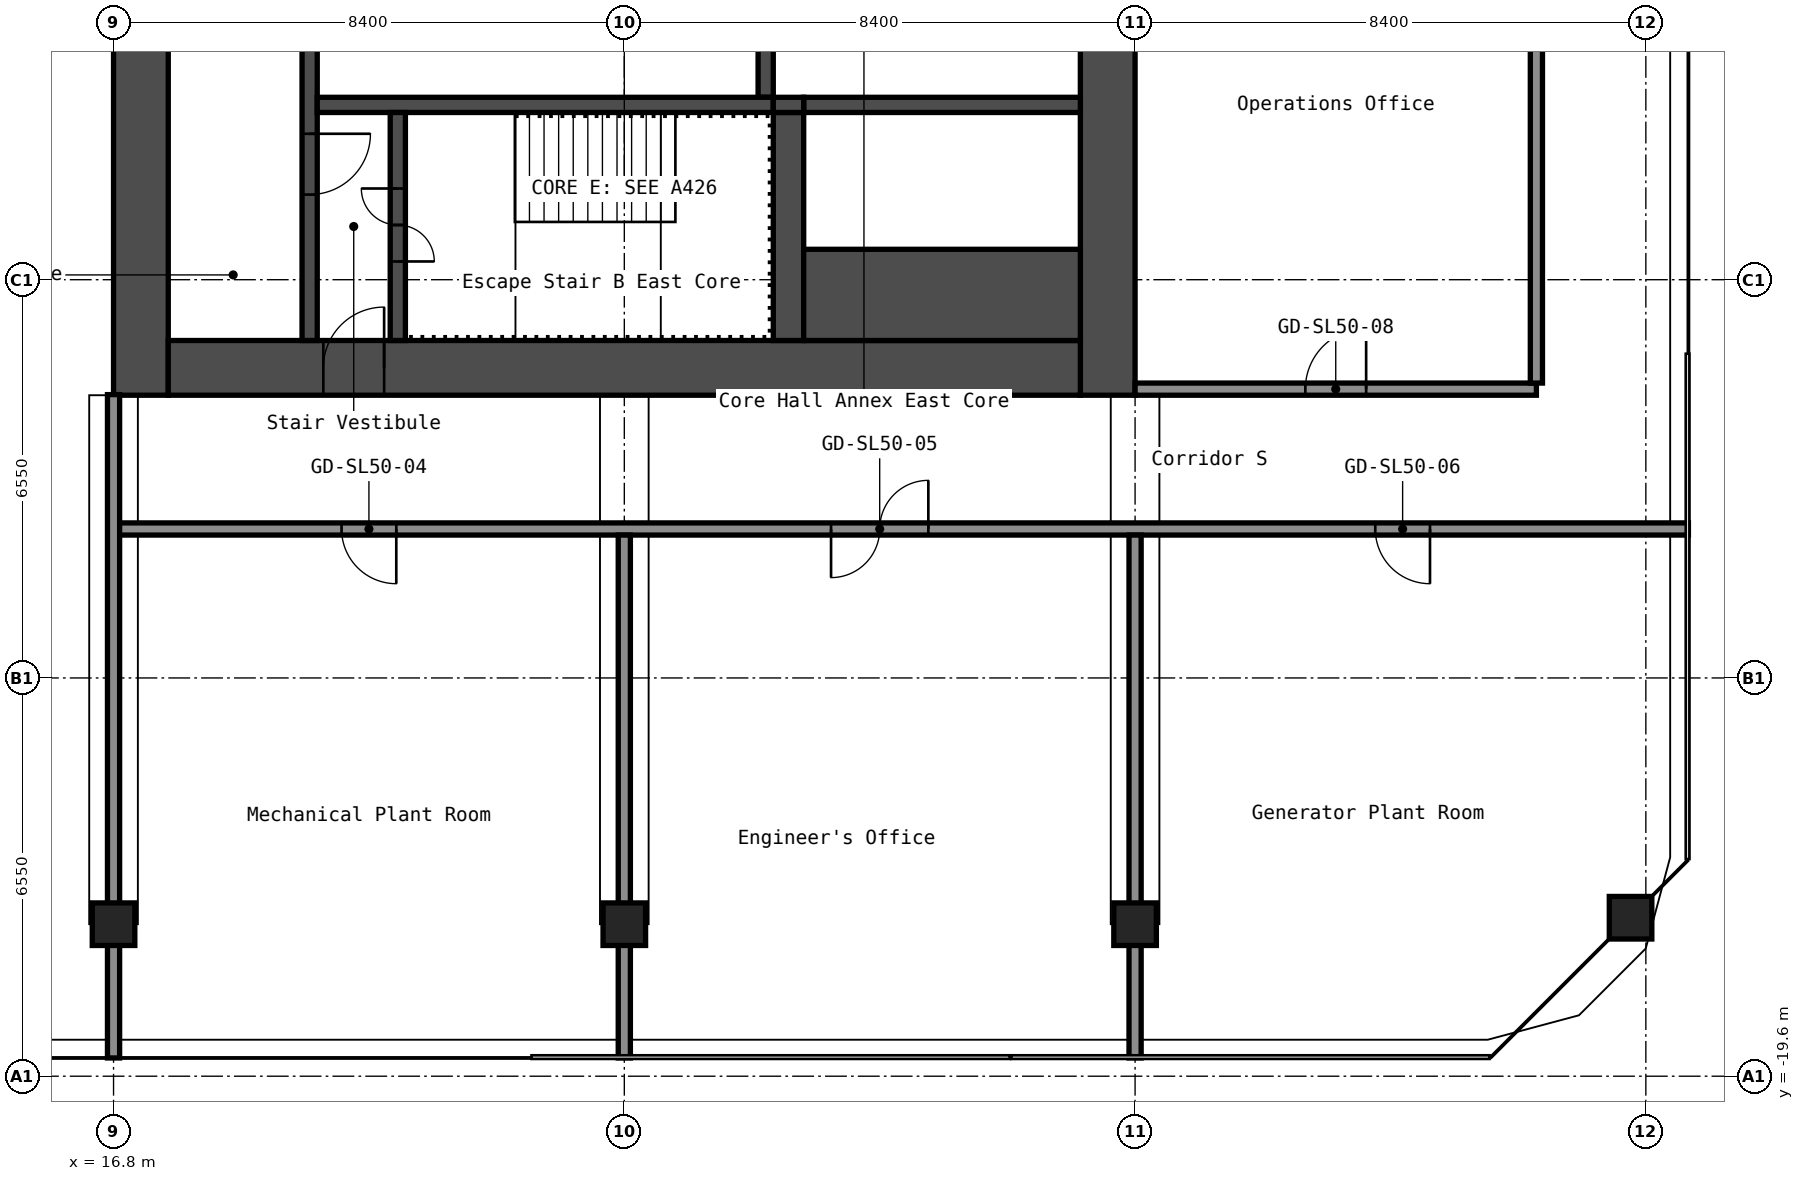
"""IFC4 building model, lengths in metres.
Left out: names, types, materials, properties, quantities, classifications, styles, units other than length and angle.
Written with IfcOpenShell. Run it as: python <this file> out.ifc"""

import sys

from ifc_helpers import new_model, si_unit, direction, frame, frame_2d, origin, origin_2d, place, context, subcontext, project, spatial, rectangle, hollow_rectangle, extrude, element, fill, save


model = new_model("IFC4")
c1 = context("Model", 3, precision=1e-05, world=origin(), true_north=direction((0.0, 1.0)))
c2 = subcontext(c1, "Body", "Model", "MODEL_VIEW")
j1 = project(units=[si_unit("LENGTHUNIT", "METRE"), si_unit("PLANEANGLEUNIT", "RADIAN")], contexts=[c1])
p1 = place(None, origin())
s1 = spatial("IfcSite", under=j1, at=p1, CompositionType="ELEMENT")
p2 = place(p1, origin())
s2 = spatial("IfcBuilding", under=s1, at=p2, CompositionType="ELEMENT")
p3 = place(p2, frame((0.0, 0.0, 175.8)))
s3 = spatial("IfcBuildingStorey", under=s2, at=p3, CompositionType="ELEMENT", Elevation=175.8)
for number, where, z_axis, x_axis in (
    (1, (16.8, -17.1, 0.0), (0.0, 0.0, 1.0), (1.0, 0.0, 0.0)),
    (2, (25.2, -17.1, 0.0), (0.0, 0.0, 1.0), (1.0, 0.0, 0.0)),
    (3, (33.6, -17.1, 0.0), (0.0, 0.0, 1.0), (1.0, 0.0, 0.0)),
    (4, (41.749, -16.994, 0.0), (0.0, 0.0, 1.0), (1.0, 0.0, 0.0)),
):
    element("IfcColumn", number, at=place(p3, frame(where, z_axis=z_axis, x_axis=x_axis)), inside=s3, PredefinedType="COLUMN", context=c2, shape_type="SweptSolid", body=[
        extrude(hollow_rectangle(XDim=0.7, YDim=0.7, WallThickness=0.028, at=origin_2d()), origin(), (0.0, 0.0, 1.0), 4.1),
    ])
p4 = place(p3, frame((17.25, -8.4, 0.0), z_axis=(0.0, 0.0, 1.0), x_axis=(0.0, 1.0, 0.0)))
e5 = element("IfcWall", 5, at=p4, inside=s3, PredefinedType="SHEAR", context=c2, shape_type="SweptSolid", body=[
    extrude(rectangle(XDim=16.8, YDim=0.9, at=frame_2d((8.4, 0.0))), origin(), (0.0, 0.0, 1.0), 4.1),
])
p5 = place(p4, frame((10.1, 0.0, 0.0)))
e6 = element("IfcOpeningElement", 6, at=p5, cuts=e5, PredefinedType="OPENING", context=c2, shape_type="SweptSolid", body=[
    extrude(rectangle(XDim=1.6, YDim=2.1, at=frame_2d((0.8, 1.05))), frame((0.0, 0.46, 0.0), z_axis=(0.0, -1.0, 0.0), x_axis=(1.0, 0.0, 0.0)), (0.0, 0.0, 1.0), 0.92),
])
p6 = place(p3, frame((33.15, -8.4, 0.0), z_axis=(0.0, 0.0, 1.0), x_axis=(0.0, 1.0, 0.0)))
e7 = element("IfcWall", 7, at=p6, inside=s3, PredefinedType="SHEAR", context=c2, shape_type="SweptSolid", body=[
    extrude(rectangle(XDim=16.8, YDim=0.9, at=frame_2d((8.4, 0.0))), origin(), (0.0, 0.0, 1.0), 4.1),
])
p7 = place(p3, frame((17.7, -7.95, 0.0), z_axis=(0.0, 0.0, 1.0), x_axis=(1.0, 0.0, 0.0)))
e8 = element("IfcWall", 8, at=p7, inside=s3, PredefinedType="SHEAR", context=c2, shape_type="SweptSolid", body=[
    extrude(rectangle(XDim=15.0, YDim=0.9, at=frame_2d((7.5, 0.0))), origin(), (0.0, 0.0, 1.0), 4.1),
])
p8 = place(p7, frame((2.55, 0.0, 0.0)))
e9 = element("IfcOpeningElement", 9, at=p8, cuts=e8, PredefinedType="OPENING", context=c2, shape_type="SweptSolid", body=[
    extrude(rectangle(XDim=1.0, YDim=2.1, at=frame_2d((0.5, 1.05))), frame((0.0, 0.46, 0.0), z_axis=(0.0, -1.0, 0.0), x_axis=(1.0, 0.0, 0.0)), (0.0, 0.0, 1.0), 0.92),
])
p9 = place(p3, frame((20.025, -7.5, 0.0), z_axis=(0.0, 0.0, 1.0), x_axis=(0.0, 1.0, 0.0)))
e10 = element("IfcWall", 10, at=p9, inside=s3, PredefinedType="SHEAR", context=c2, shape_type="SweptSolid", body=[
    extrude(rectangle(XDim=6.3, YDim=0.25, at=frame_2d((3.15, 0.0))), origin(), (0.0, 0.0, 1.0), 4.1),
])
p10 = place(p9, frame((2.4, 0.0, 0.0)))
e11 = element("IfcOpeningElement", 11, at=p10, cuts=e10, PredefinedType="OPENING", context=c2, shape_type="SweptSolid", body=[
    extrude(rectangle(XDim=1.0, YDim=2.1, at=frame_2d((0.5, 1.05))), frame((0.0, 0.135, 0.0), z_axis=(0.0, -1.0, 0.0), x_axis=(1.0, 0.0, 0.0)), (0.0, 0.0, 1.0), 0.27),
])
p11 = place(p3, frame((27.525, -3.5, 0.0), z_axis=(0.0, 0.0, 1.0), x_axis=(0.0, 1.0, 0.0)))
e12 = element("IfcWall", 12, at=p11, inside=s3, PredefinedType="SHEAR", context=c2, shape_type="SweptSolid", body=[
    extrude(rectangle(XDim=2.05, YDim=0.25, at=frame_2d((1.025, 0.0))), origin(), (0.0, 0.0, 1.0), 4.1),
])
p12 = place(p3, frame((20.15, -3.625, 0.0), z_axis=(0.0, 0.0, 1.0), x_axis=(1.0, 0.0, 0.0)))
e13 = element("IfcWall", 13, at=p12, inside=s3, PredefinedType="SHEAR", context=c2, shape_type="SweptSolid", body=[
    extrude(rectangle(XDim=7.5, YDim=0.25, at=frame_2d((3.75, 0.0))), origin(), (0.0, 0.0, 1.0), 4.1),
])
p13 = place(p3, frame((21.475, -7.5, 0.0), z_axis=(0.0, 0.0, 1.0), x_axis=(0.0, 1.0, 0.0)))
e14 = element("IfcWall", 14, at=p13, inside=s3, PredefinedType="SHEAR", context=c2, shape_type="SweptSolid", body=[
    extrude(rectangle(XDim=3.75, YDim=0.25, at=frame_2d((1.875, 0.0))), origin(), (0.0, 0.0, 1.0), 4.1),
])
p14 = place(p13, frame((1.3, 0.0, 0.0)))
e15 = element("IfcOpeningElement", 15, at=p14, cuts=e14, PredefinedType="OPENING", context=c2, shape_type="SweptSolid", body=[
    extrude(rectangle(XDim=1.2, YDim=2.1, at=frame_2d((0.6, 1.05))), frame((0.0, 0.135, 0.0), z_axis=(0.0, -1.0, 0.0), x_axis=(1.0, 0.0, 0.0)), (0.0, 0.0, 1.0), 0.27),
])
p15 = place(p3, frame((27.9, -7.5, 0.0), z_axis=(0.0, 0.0, 1.0), x_axis=(0.0, 1.0, 0.0)))
e16 = element("IfcWall", 16, at=p15, inside=s3, PredefinedType="SHEAR", context=c2, shape_type="SweptSolid", body=[
    extrude(rectangle(XDim=3.75, YDim=0.5, at=frame_2d((1.875, 0.0))), origin(), (0.0, 0.0, 1.0), 4.1),
])
p16 = place(p3, frame((28.15, -3.625, 0.0), z_axis=(0.0, 0.0, 1.0), x_axis=(1.0, 0.0, 0.0)))
e17 = element("IfcWall", 17, at=p16, inside=s3, PredefinedType="SHEAR", context=c2, shape_type="SweptSolid", body=[
    extrude(rectangle(XDim=4.55, YDim=0.25, at=frame_2d((2.275, 0.0))), origin(), (0.0, 0.0, 1.0), 4.1),
])
p17 = place(p3, frame((28.15, -6.75, 0.0), z_axis=(0.0, 0.0, 1.0), x_axis=(1.0, 0.0, 0.0)))
e18 = element("IfcWall", 18, at=p17, inside=s3, PredefinedType="SHEAR", context=c2, shape_type="SweptSolid", body=[
    extrude(rectangle(XDim=4.55, YDim=1.5, at=frame_2d((2.275, 0.0))), origin(), (0.0, 0.0, 1.0), 4.1),
])
p18 = place(p3, frame((27.65, -3.625, 0.0), z_axis=(0.0, 0.0, 1.0), x_axis=(1.0, 0.0, 0.0)))
e19 = element("IfcWall", 19, at=p18, inside=s3, PredefinedType="SHEAR", context=c2, shape_type="SweptSolid", body=[
    extrude(rectangle(XDim=0.5, YDim=0.25, at=frame_2d((0.25, 0.0))), origin(), (0.0, 0.0, 1.0), 4.1),
])
p19 = place(p3, frame((16.8, -10.6, 0.0), z_axis=(0.0, 0.0, 1.0), x_axis=(1.0, 0.0, 0.0)))
e20 = element("IfcWall", 20, at=p19, inside=s3, PredefinedType="PARTITIONING", context=c2, shape_type="SweptSolid", body=[
    extrude(rectangle(XDim=25.9, YDim=0.2, at=frame_2d((12.95, 0.0))), origin(), (0.0, 0.0, 1.0), 4.1),
])
p20 = place(p19, frame((3.75, 0.0, 0.0)))
e21 = element("IfcOpeningElement", 21, at=p20, cuts=e20, PredefinedType="OPENING", context=c2, shape_type="SweptSolid", body=[
    extrude(rectangle(XDim=0.9, YDim=2.1, at=frame_2d((0.45, 1.05))), frame((0.0, 0.11, 0.0), z_axis=(0.0, -1.0, 0.0), x_axis=(1.0, 0.0, 0.0)), (0.0, 0.0, 1.0), 0.22),
])
p21 = place(p19, frame((11.8, 0.0, 0.0)))
e22 = element("IfcOpeningElement", 22, at=p21, cuts=e20, PredefinedType="OPENING", context=c2, shape_type="SweptSolid", body=[
    extrude(rectangle(XDim=1.6, YDim=2.1, at=frame_2d((0.8, 1.05))), frame((0.0, 0.11, 0.0), z_axis=(0.0, -1.0, 0.0), x_axis=(1.0, 0.0, 0.0)), (0.0, 0.0, 1.0), 0.22),
])
p22 = place(p19, frame((20.75, 0.0, 0.0)))
e23 = element("IfcOpeningElement", 23, at=p22, cuts=e20, PredefinedType="OPENING", context=c2, shape_type="SweptSolid", body=[
    extrude(rectangle(XDim=0.9, YDim=2.1, at=frame_2d((0.45, 1.05))), frame((0.0, 0.11, 0.0), z_axis=(0.0, -1.0, 0.0), x_axis=(1.0, 0.0, 0.0)), (0.0, 0.0, 1.0), 0.22),
])
p23 = place(p3, frame((33.6, -8.3, 0.0), z_axis=(0.0, 0.0, 1.0), x_axis=(1.0, 0.0, 0.0)))
e24 = element("IfcWall", 24, at=p23, inside=s3, PredefinedType="PARTITIONING", context=c2, shape_type="SweptSolid", body=[
    extrude(rectangle(XDim=6.6, YDim=0.2, at=frame_2d((3.3, 0.0))), origin(), (0.0, 0.0, 1.0), 4.1),
])
p24 = place(p23, frame((2.8, 0.0, 0.0)))
e25 = element("IfcOpeningElement", 25, at=p24, cuts=e24, PredefinedType="OPENING", context=c2, shape_type="SweptSolid", body=[
    extrude(rectangle(XDim=1.0, YDim=2.1, at=frame_2d((0.5, 1.05))), frame((0.0, 0.11, 0.0), z_axis=(0.0, -1.0, 0.0), x_axis=(1.0, 0.0, 0.0)), (0.0, 0.0, 1.0), 0.22),
])
p25 = place(p3, frame((16.8, -19.3, 0.0), z_axis=(0.0, 0.0, 1.0), x_axis=(0.0, 1.0, 0.0)))
e26 = element("IfcWall", 26, at=p25, inside=s3, PredefinedType="PARTITIONING", context=c2, shape_type="SweptSolid", body=[
    extrude(rectangle(XDim=10.91, YDim=0.2, at=frame_2d((5.455, 0.0))), origin(), (0.0, 0.0, 1.0), 4.1),
])
for number, where, z_axis, x_axis in (
    (27, (25.2, -19.3, 0.0), (0.0, 0.0, 1.0), (0.0, 1.0, 0.0)),
    (28, (33.6, -19.3, 0.0), (0.0, 0.0, 1.0), (0.0, 1.0, 0.0)),
):
    element("IfcWall", number, at=place(p3, frame(where, z_axis=z_axis, x_axis=x_axis)), inside=s3, PredefinedType="PARTITIONING", context=c2, shape_type="SweptSolid", body=[
        extrude(rectangle(XDim=8.6, YDim=0.2, at=frame_2d((4.3, 0.0))), origin(), (0.0, 0.0, 1.0), 4.1),
    ])
p26 = place(p3, frame((40.2, -8.2, 0.0), z_axis=(0.0, 0.0, 1.0), x_axis=(0.0, 1.0, 0.0)))
e29 = element("IfcWall", 29, at=p26, inside=s3, PredefinedType="PARTITIONING", context=c2, shape_type="SweptSolid", body=[
    extrude(rectangle(XDim=16.4, YDim=0.2, at=frame_2d((8.2, 0.0))), origin(), (0.0, 0.0, 1.0), 4.1),
])
p27 = place(p8, origin())
e30 = element("IfcDoor", 30, at=p27, inside=s3, OperationType="SINGLE_SWING_LEFT", PredefinedType="DOOR", context=c2, shape_type="SweptSolid", body=[
    extrude(rectangle(XDim=1.0, YDim=2.1, at=frame_2d((0.5, 1.05))), frame((0.0, 0.025, 0.0), z_axis=(0.0, -1.0, 0.0), x_axis=(1.0, 0.0, 0.0)), (0.0, 0.0, 1.0), 0.05),
])
fill(e9, e30)
p28 = place(p14, origin())
e31 = element("IfcDoor", 31, at=p28, inside=s3, OperationType="DOUBLE_DOOR_SINGLE_SWING", PredefinedType="DOOR", context=c2, shape_type="SweptSolid", body=[
    extrude(rectangle(XDim=1.2, YDim=2.1, at=frame_2d((0.6, 1.05))), frame((0.0, 0.025, 0.0), z_axis=(0.0, -1.0, 0.0), x_axis=(1.0, 0.0, 0.0)), (0.0, 0.0, 1.0), 0.05),
])
fill(e15, e31)
p29 = place(p10, origin())
e32 = element("IfcDoor", 32, at=p29, inside=s3, OperationType="SINGLE_SWING_RIGHT", PredefinedType="DOOR", context=c2, shape_type="SweptSolid", body=[
    extrude(rectangle(XDim=1.0, YDim=2.1, at=frame_2d((0.5, 1.05))), frame((0.0, 0.025, 0.0), z_axis=(0.0, -1.0, 0.0), x_axis=(1.0, 0.0, 0.0)), (0.0, 0.0, 1.0), 0.05),
])
fill(e11, e32)
p30 = place(p20, origin())
e33 = element("IfcDoor", 33, at=p30, inside=s3, OperationType="SINGLE_SWING_RIGHT", PredefinedType="DOOR", context=c2, shape_type="SweptSolid", body=[
    extrude(rectangle(XDim=0.9, YDim=2.1, at=frame_2d((0.45, 1.05))), frame((0.0, 0.025, 0.0), z_axis=(0.0, -1.0, 0.0), x_axis=(1.0, 0.0, 0.0)), (0.0, 0.0, 1.0), 0.05),
])
fill(e21, e33)
p31 = place(p21, origin())
e34 = element("IfcDoor", 34, at=p31, inside=s3, OperationType="DOUBLE_DOOR_SINGLE_SWING", PredefinedType="DOOR", context=c2, shape_type="SweptSolid", body=[
    extrude(rectangle(XDim=1.6, YDim=2.1, at=frame_2d((0.8, 1.05))), frame((0.0, 0.025, 0.0), z_axis=(0.0, -1.0, 0.0), x_axis=(1.0, 0.0, 0.0)), (0.0, 0.0, 1.0), 0.05),
])
fill(e22, e34)
p32 = place(p22, origin())
e35 = element("IfcDoor", 35, at=p32, inside=s3, OperationType="SINGLE_SWING_RIGHT", PredefinedType="DOOR", context=c2, shape_type="SweptSolid", body=[
    extrude(rectangle(XDim=0.9, YDim=2.1, at=frame_2d((0.45, 1.05))), frame((0.0, 0.025, 0.0), z_axis=(0.0, -1.0, 0.0), x_axis=(1.0, 0.0, 0.0)), (0.0, 0.0, 1.0), 0.05),
])
fill(e23, e35)
p33 = place(p24, origin())
e36 = element("IfcDoor", 36, at=p33, inside=s3, OperationType="SINGLE_SWING_LEFT", PredefinedType="DOOR", context=c2, shape_type="SweptSolid", body=[
    extrude(rectangle(XDim=1.0, YDim=2.1, at=frame_2d((0.5, 1.05))), frame((0.0, 0.025, 0.0), z_axis=(0.0, -1.0, 0.0), x_axis=(1.0, 0.0, 0.0)), (0.0, 0.0, 1.0), 0.05),
])
fill(e25, e36)
save(model, sys.argv[1])
